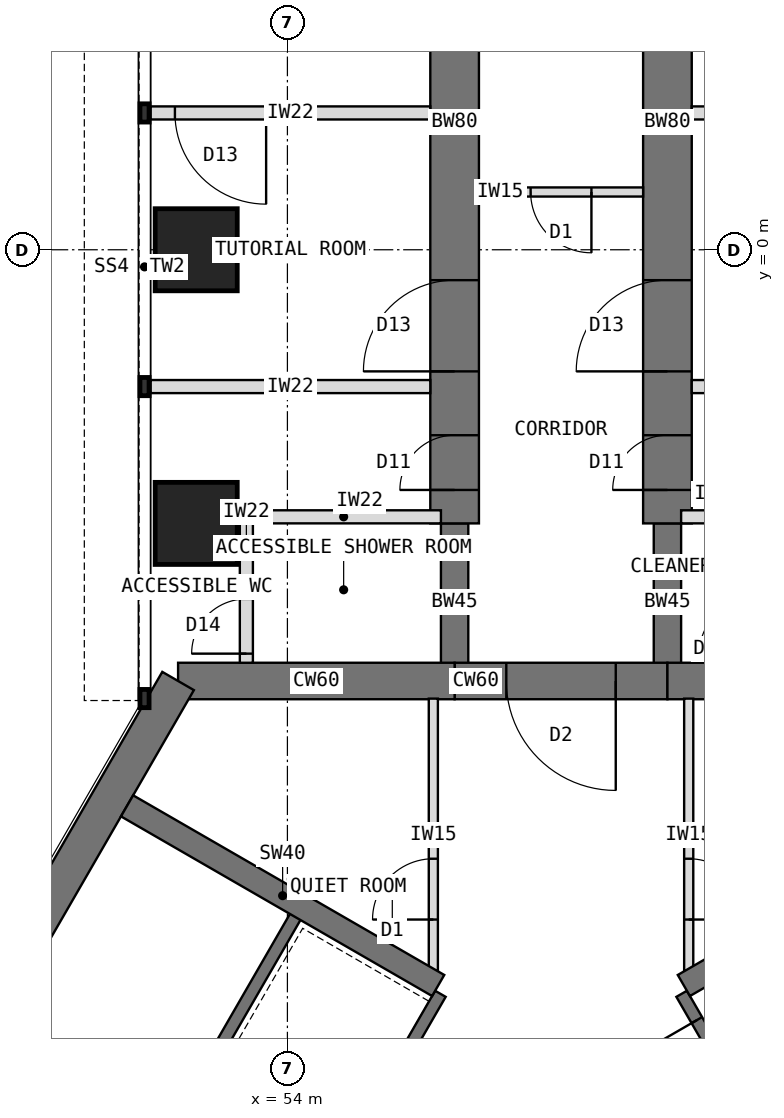
"""IFC4 building model, lengths in metres.
Left out: names, types, materials, properties, quantities, classifications, styles, units other than length and angle.
Written with IfcOpenShell. Run it as: python <this file> out.ifc"""

import sys

from ifc_helpers import new_model, si_unit, direction, frame, frame_2d, origin, origin_2d, place, context, subcontext, project, spatial, rectangle, extrude, element, fill, save


model = new_model("IFC4")
c1 = context("Model", 3, precision=1e-05, world=origin(), true_north=direction((0.0, 1.0)))
c2 = subcontext(c1, "Body", "Model", "MODEL_VIEW")
j1 = project(units=[si_unit("LENGTHUNIT", "METRE"), si_unit("PLANEANGLEUNIT", "RADIAN")], contexts=[c1])
p1 = place(None, origin())
s1 = spatial("IfcSite", under=j1, at=p1, CompositionType="ELEMENT")
p2 = place(p1, origin())
s2 = spatial("IfcBuilding", under=s1, at=p2, CompositionType="ELEMENT")
p3 = place(p2, frame((0.0, 0.0, 113.5)))
s3 = spatial("IfcBuildingStorey", under=s2, at=p3, CompositionType="ELEMENT", Elevation=113.5)
p4 = place(p3, frame((64.798, -7.092, 0.0), z_axis=(0.0, 0.0, 1.0), x_axis=(-1.0, 0.0, 0.0)))
e1 = element("IfcWall", 1, at=p4, inside=s3, PredefinedType="SHEAR", context=c2, shape_type="SweptSolid", body=[
    extrude(rectangle(XDim=4.548, YDim=0.6, at=frame_2d((2.274, 0.0))), origin(), (0.0, 0.0, 1.0), 4.0),
])
p5 = place(p3, frame((60.25, -7.092, 0.0), z_axis=(0.0, 0.0, 1.0), x_axis=(-1.0, 0.0, 0.0)))
e2 = element("IfcWall", 2, at=p5, inside=s3, PredefinedType="SHEAR", context=c2, shape_type="SweptSolid", body=[
    extrude(rectangle(XDim=3.5, YDim=0.6, at=frame_2d((1.75, 0.0))), origin(), (0.0, 0.0, 1.0), 4.0),
])
p6 = place(p5, frame((0.85, 0.0, 0.0)))
e3 = element("IfcOpeningElement", 3, at=p6, cuts=e2, PredefinedType="OPENING", context=c2, shape_type="SweptSolid", body=[
    extrude(rectangle(XDim=1.8, YDim=2.1, at=frame_2d((0.9, 1.05))), frame((0.0, 0.31, 0.0), z_axis=(0.0, -1.0, 0.0), x_axis=(1.0, 0.0, 0.0)), (0.0, 0.0, 1.0), 0.62),
])
p7 = place(p3, frame((56.75, -7.092, 0.0), z_axis=(0.0, 0.0, 1.0), x_axis=(-1.0, 0.0, 0.0)))
e4 = element("IfcWall", 4, at=p7, inside=s3, PredefinedType="SHEAR", context=c2, shape_type="SweptSolid", body=[
    extrude(rectangle(XDim=4.548, YDim=0.6, at=frame_2d((2.274, 0.0))), origin(), (0.0, 0.0, 1.0), 4.0),
])
p8 = place(p3, frame((52.202, -7.092, 0.0), z_axis=(0.0, 0.0, 1.0), x_axis=(-0.500005998175, -0.866021940709, 0.0)))
e5 = element("IfcWall", 5, at=p8, inside=s3, PredefinedType="SHEAR", context=c2, shape_type="SweptSolid", body=[
    extrude(rectangle(XDim=12.596, YDim=0.6, at=frame_2d((6.298, 0.0))), origin(), (0.0, 0.0, 1.0), 4.0),
])
p9 = place(p3, frame((56.75, -7.092, 0.0), z_axis=(0.0, 0.0, 1.0), x_axis=(0.0, 1.0, 0.0)))
e6 = element("IfcWall", 6, at=p9, inside=s3, PredefinedType="SHEAR", context=c2, shape_type="SweptSolid", body=[
    extrude(rectangle(XDim=2.592, YDim=0.45, at=frame_2d((1.296, 0.0))), origin(), (0.0, 0.0, 1.0), 4.0),
])
p10 = place(p3, frame((56.75, -4.5, 0.0), z_axis=(0.0, 0.0, 1.0), x_axis=(0.0, 1.0, 0.0)))
e7 = element("IfcWall", 7, at=p10, inside=s3, PredefinedType="SHEAR", context=c2, shape_type="SweptSolid", body=[
    extrude(rectangle(XDim=13.2, YDim=0.8, at=frame_2d((6.6, 0.0))), origin(), (0.0, 0.0, 1.0), 4.0),
])
p11 = place(p10, frame((0.55, 0.0, 0.0)))
e8 = element("IfcOpeningElement", 8, at=p11, cuts=e7, PredefinedType="OPENING", context=c2, shape_type="SweptSolid", body=[
    extrude(rectangle(XDim=0.9, YDim=2.1, at=frame_2d((0.45, 1.05))), frame((0.0, 0.41, 0.0), z_axis=(0.0, -1.0, 0.0), x_axis=(1.0, 0.0, 0.0)), (0.0, 0.0, 1.0), 0.82),
])
p12 = place(p10, frame((2.5, 0.0, 0.0)))
e9 = element("IfcOpeningElement", 9, at=p12, cuts=e7, PredefinedType="OPENING", context=c2, shape_type="SweptSolid", body=[
    extrude(rectangle(XDim=1.5, YDim=2.1, at=frame_2d((0.75, 1.05))), frame((0.0, 0.41, 0.0), z_axis=(0.0, -1.0, 0.0), x_axis=(1.0, 0.0, 0.0)), (0.0, 0.0, 1.0), 0.82),
])
p13 = place(p3, frame((60.25, -7.092, 0.0), z_axis=(0.0, 0.0, 1.0), x_axis=(0.0, 1.0, 0.0)))
e10 = element("IfcWall", 10, at=p13, inside=s3, PredefinedType="SHEAR", context=c2, shape_type="SweptSolid", body=[
    extrude(rectangle(XDim=2.592, YDim=0.45, at=frame_2d((1.296, 0.0))), origin(), (0.0, 0.0, 1.0), 4.0),
])
p14 = place(p3, frame((60.25, -4.5, 0.0), z_axis=(0.0, 0.0, 1.0), x_axis=(0.0, 1.0, 0.0)))
e11 = element("IfcWall", 11, at=p14, inside=s3, PredefinedType="SHEAR", context=c2, shape_type="SweptSolid", body=[
    extrude(rectangle(XDim=13.2, YDim=0.8, at=frame_2d((6.6, 0.0))), origin(), (0.0, 0.0, 1.0), 4.0),
])
p15 = place(p14, frame((0.55, 0.0, 0.0)))
e12 = element("IfcOpeningElement", 12, at=p15, cuts=e11, PredefinedType="OPENING", context=c2, shape_type="SweptSolid", body=[
    extrude(rectangle(XDim=0.9, YDim=2.1, at=frame_2d((0.45, 1.05))), frame((0.0, 0.41, 0.0), z_axis=(0.0, -1.0, 0.0), x_axis=(1.0, 0.0, 0.0)), (0.0, 0.0, 1.0), 0.82),
])
p16 = place(p14, frame((2.5, 0.0, 0.0)))
e13 = element("IfcOpeningElement", 13, at=p16, cuts=e11, PredefinedType="OPENING", context=c2, shape_type="SweptSolid", body=[
    extrude(rectangle(XDim=1.5, YDim=2.1, at=frame_2d((0.75, 1.05))), frame((0.0, 0.41, 0.0), z_axis=(0.0, -1.0, 0.0), x_axis=(1.0, 0.0, 0.0)), (0.0, 0.0, 1.0), 0.82),
])
for number, where, z_axis, x_axis in (
    (14, (52.5, -4.5, 0.0), (0.0, 0.0, 1.0), (1.0, 0.0, 0.0)),
    (15, (52.5, 0.0, 0.0), (0.0, 0.0, 1.0), (1.0, 0.0, 0.0)),
):
    element("IfcColumn", number, at=place(p3, frame(where, z_axis=z_axis, x_axis=x_axis)), inside=s3, PredefinedType="COLUMN", context=c2, shape_type="SweptSolid", body=[
        extrude(rectangle(XDim=1.35, YDim=1.35, at=origin_2d()), origin(), (0.0, 0.0, 1.0), 4.0),
    ])
p17 = place(p3, frame((56.516, -12.236, 0.0), z_axis=(0.0, 0.0, 1.0), x_axis=(-0.49999894854, -0.866026010844, 0.0)))
e16 = element("IfcWall", 16, at=p17, inside=s3, PredefinedType="SHEAR", context=c2, shape_type="SweptSolid", body=[
    extrude(rectangle(XDim=8.0, YDim=0.2, at=frame_2d((4.0, 0.0))), origin(), (0.0, 0.0, 1.0), 4.0),
])
p18 = place(p17, frame((6.3, 0.0, 0.0)))
e17 = element("IfcOpeningElement", 17, at=p18, cuts=e16, PredefinedType="OPENING", context=c2, shape_type="SweptSolid", body=[
    extrude(rectangle(XDim=1.2, YDim=2.1, at=frame_2d((0.6, 1.05))), frame((0.0, 0.11, 0.0), z_axis=(0.0, -1.0, 0.0), x_axis=(1.0, 0.0, 0.0)), (0.0, 0.0, 1.0), 0.22),
])
p19 = place(p3, frame((54.178, -10.886, 0.0), z_axis=(0.0, 0.0, 1.0), x_axis=(-0.49999894854, -0.866026010844, 0.0)))
e18 = element("IfcWall", 18, at=p19, inside=s3, PredefinedType="SHEAR", context=c2, shape_type="SweptSolid", body=[
    extrude(rectangle(XDim=8.0, YDim=0.2, at=frame_2d((4.0, 0.0))), origin(), (0.0, 0.0, 1.0), 4.0),
])
p20 = place(p19, frame((6.8, 0.0, 0.0)))
e19 = element("IfcOpeningElement", 19, at=p20, cuts=e18, PredefinedType="OPENING", context=c2, shape_type="SweptSolid", body=[
    extrude(rectangle(XDim=0.9, YDim=2.1, at=frame_2d((0.45, 1.05))), frame((0.0, 0.11, 0.0), z_axis=(0.0, -1.0, 0.0), x_axis=(1.0, 0.0, 0.0)), (0.0, 0.0, 1.0), 0.22),
])
p21 = place(p3, frame((56.48, -12.099, 0.0), z_axis=(0.0, 0.0, 1.0), x_axis=(-0.866009424208, 0.500027676417, 0.0)))
e20 = element("IfcWall", 20, at=p21, inside=s3, PredefinedType="SHEAR", context=c2, shape_type="SweptSolid", body=[
    extrude(rectangle(XDim=5.908, YDim=0.4, at=frame_2d((2.954, 0.0))), origin(), (0.0, 0.0, 1.0), 4.0),
])
p22 = place(p3, frame((64.484, -19.164, 0.0), z_axis=(0.0, 0.0, 1.0), x_axis=(-0.49999894854, 0.866026010844, 0.0)))
e21 = element("IfcWall", 21, at=p22, inside=s3, PredefinedType="SHEAR", context=c2, shape_type="SweptSolid", body=[
    extrude(rectangle(XDim=8.0, YDim=0.2, at=frame_2d((4.0, 0.0))), origin(), (0.0, 0.0, 1.0), 4.0),
])
p23 = place(p22, frame((6.3, 0.0, 0.0)))
e22 = element("IfcOpeningElement", 22, at=p23, cuts=e21, PredefinedType="OPENING", context=c2, shape_type="SweptSolid", body=[
    extrude(rectangle(XDim=1.2, YDim=2.1, at=frame_2d((0.6, 1.05))), frame((0.0, 0.11, 0.0), z_axis=(0.0, -1.0, 0.0), x_axis=(1.0, 0.0, 0.0)), (0.0, 0.0, 1.0), 0.22),
])
p24 = place(p22, frame((0.9, 0.0, 0.0)))
e23 = element("IfcOpeningElement", 23, at=p24, cuts=e21, PredefinedType="OPENING", context=c2, shape_type="SweptSolid", body=[
    extrude(rectangle(XDim=1.1, YDim=2.2, at=frame_2d((0.55, 1.1))), frame((0.0, 0.11, 0.0), z_axis=(0.0, -1.0, 0.0), x_axis=(1.0, 0.0, 0.0)), (0.0, 0.0, 1.0), 0.22),
])
p25 = place(p22, frame((3.8, 0.0, 0.0)))
e24 = element("IfcOpeningElement", 24, at=p25, cuts=e21, PredefinedType="OPENING", context=c2, shape_type="SweptSolid", body=[
    extrude(rectangle(XDim=1.1, YDim=2.2, at=frame_2d((0.55, 1.1))), frame((0.0, 0.11, 0.0), z_axis=(0.0, -1.0, 0.0), x_axis=(1.0, 0.0, 0.0)), (0.0, 0.0, 1.0), 0.22),
])
p26 = place(p3, frame((60.52, -12.099, 0.0), z_axis=(0.0, 0.0, 1.0), x_axis=(0.866009424208, 0.500027676417, 0.0)))
e25 = element("IfcWall", 25, at=p26, inside=s3, PredefinedType="SHEAR", context=c2, shape_type="SweptSolid", body=[
    extrude(rectangle(XDim=5.908, YDim=0.4, at=frame_2d((2.954, 0.0))), origin(), (0.0, 0.0, 1.0), 4.0),
])
p27 = place(p3, frame((56.35, -2.25, 0.0), z_axis=(0.0, 0.0, 1.0), x_axis=(-1.0, 0.0, 0.0)))
e26 = element("IfcWall", 26, at=p27, inside=s3, PredefinedType="PARTITIONING", context=c2, shape_type="SweptSolid", body=[
    extrude(rectangle(XDim=4.6, YDim=0.215, at=frame_2d((2.3, 0.0))), origin(), (0.0, 0.0, 1.0), 3.8),
])
p28 = place(p3, frame((56.35, 2.25, 0.0), z_axis=(0.0, 0.0, 1.0), x_axis=(-1.0, 0.0, 0.0)))
e27 = element("IfcWall", 27, at=p28, inside=s3, PredefinedType="PARTITIONING", context=c2, shape_type="SweptSolid", body=[
    extrude(rectangle(XDim=4.6, YDim=0.215, at=frame_2d((2.3, 0.0))), origin(), (0.0, 0.0, 1.0), 3.8),
])
p29 = place(p28, frame((2.7, 0.0, 0.0)))
e28 = element("IfcOpeningElement", 28, at=p29, cuts=e27, PredefinedType="OPENING", context=c2, shape_type="SweptSolid", body=[
    extrude(rectangle(XDim=1.5, YDim=2.1, at=frame_2d((0.75, 1.05))), frame((0.0, 0.117, 0.0), z_axis=(0.0, -1.0, 0.0), x_axis=(1.0, 0.0, 0.0)), (0.0, 0.0, 1.0), 0.235),
])
p30 = place(p3, frame((53.325, -6.792, 0.0), z_axis=(0.0, 0.0, 1.0), x_axis=(0.0, 1.0, 0.0)))
e29 = element("IfcWall", 29, at=p30, inside=s3, PredefinedType="PARTITIONING", context=c2, shape_type="SweptSolid", body=[
    extrude(rectangle(XDim=2.4, YDim=0.215, at=frame_2d((1.2, 0.0))), origin(), (0.0, 0.0, 1.0), 3.8),
])
p31 = place(p30, frame((0.15, 0.0, 0.0)))
e30 = element("IfcOpeningElement", 30, at=p31, cuts=e29, PredefinedType="OPENING", context=c2, shape_type="SweptSolid", body=[
    extrude(rectangle(XDim=0.9, YDim=2.1, at=frame_2d((0.45, 1.05))), frame((0.0, 0.117, 0.0), z_axis=(0.0, -1.0, 0.0), x_axis=(1.0, 0.0, 0.0)), (0.0, 0.0, 1.0), 0.235),
])
p32 = place(p3, frame((56.525, -4.392, 0.0), z_axis=(0.0, 0.0, 1.0), x_axis=(-1.0, 0.0, 0.0)))
e31 = element("IfcWall", 31, at=p32, inside=s3, PredefinedType="PARTITIONING", context=c2, shape_type="SweptSolid", body=[
    extrude(rectangle(XDim=3.2, YDim=0.215, at=frame_2d((1.6, 0.0))), origin(), (0.0, 0.0, 1.0), 3.8),
])
p33 = place(p3, frame((60.65, -2.25, 0.0), z_axis=(0.0, 0.0, 1.0), x_axis=(1.0, 0.0, 0.0)))
e32 = element("IfcWall", 32, at=p33, inside=s3, PredefinedType="PARTITIONING", context=c2, shape_type="SweptSolid", body=[
    extrude(rectangle(XDim=4.6, YDim=0.215, at=frame_2d((2.3, 0.0))), origin(), (0.0, 0.0, 1.0), 3.8),
])
p34 = place(p3, frame((60.65, 2.25, 0.0), z_axis=(0.0, 0.0, 1.0), x_axis=(1.0, 0.0, 0.0)))
e33 = element("IfcWall", 33, at=p34, inside=s3, PredefinedType="PARTITIONING", context=c2, shape_type="SweptSolid", body=[
    extrude(rectangle(XDim=4.6, YDim=0.215, at=frame_2d((2.3, 0.0))), origin(), (0.0, 0.0, 1.0), 3.8),
])
p35 = place(p34, frame((2.7, 0.0, 0.0)))
e34 = element("IfcOpeningElement", 34, at=p35, cuts=e33, PredefinedType="OPENING", context=c2, shape_type="SweptSolid", body=[
    extrude(rectangle(XDim=1.5, YDim=2.1, at=frame_2d((0.75, 1.05))), frame((0.0, 0.117, 0.0), z_axis=(0.0, -1.0, 0.0), x_axis=(1.0, 0.0, 0.0)), (0.0, 0.0, 1.0), 0.235),
])
p36 = place(p3, frame((60.475, -4.392, 0.0), z_axis=(0.0, 0.0, 1.0), x_axis=(1.0, 0.0, 0.0)))
e35 = element("IfcWall", 35, at=p36, inside=s3, PredefinedType="PARTITIONING", context=c2, shape_type="SweptSolid", body=[
    extrude(rectangle(XDim=1.2, YDim=0.215, at=frame_2d((0.6, 0.0))), origin(), (0.0, 0.0, 1.0), 3.8),
])
p37 = place(p3, frame((56.4, -11.857, 0.0), z_axis=(0.0, 0.0, 1.0), x_axis=(0.0, 1.0, 0.0)))
e36 = element("IfcWall", 36, at=p37, inside=s3, PredefinedType="PARTITIONING", context=c2, shape_type="SweptSolid", body=[
    extrude(rectangle(XDim=4.476, YDim=0.15, at=frame_2d((2.238, 0.0))), origin(), (0.0, 0.0, 1.0), 3.8),
])
p38 = place(p37, frame((0.843, 0.0, 0.0)))
e37 = element("IfcOpeningElement", 37, at=p38, cuts=e36, PredefinedType="OPENING", context=c2, shape_type="SweptSolid", body=[
    extrude(rectangle(XDim=1.0, YDim=2.1, at=frame_2d((0.5, 1.05))), frame((0.0, 0.085, 0.0), z_axis=(0.0, -1.0, 0.0), x_axis=(1.0, 0.0, 0.0)), (0.0, 0.0, 1.0), 0.17),
])
p39 = place(p3, frame((60.6, -7.382, 0.0), z_axis=(0.0, 0.0, 1.0), x_axis=(0.0, -1.0, 0.0)))
e38 = element("IfcWall", 38, at=p39, inside=s3, PredefinedType="PARTITIONING", context=c2, shape_type="SweptSolid", body=[
    extrude(rectangle(XDim=4.476, YDim=0.15, at=frame_2d((2.238, 0.0))), origin(), (0.0, 0.0, 1.0), 3.8),
])
p40 = place(p39, frame((2.633, 0.0, 0.0)))
e39 = element("IfcOpeningElement", 39, at=p40, cuts=e38, PredefinedType="OPENING", context=c2, shape_type="SweptSolid", body=[
    extrude(rectangle(XDim=1.0, YDim=2.1, at=frame_2d((0.5, 1.05))), frame((0.0, 0.085, 0.0), z_axis=(0.0, -1.0, 0.0), x_axis=(1.0, 0.0, 0.0)), (0.0, 0.0, 1.0), 0.17),
])
p41 = place(p3, frame((59.85, 0.95, 0.0), z_axis=(0.0, 0.0, 1.0), x_axis=(-1.0, 0.0, 0.0)))
e40 = element("IfcWall", 40, at=p41, inside=s3, PredefinedType="PARTITIONING", context=c2, shape_type="SweptSolid", body=[
    extrude(rectangle(XDim=2.7, YDim=0.15, at=frame_2d((1.35, 0.0))), origin(), (0.0, 0.0, 1.0), 3.8),
])
p42 = place(p41, frame((0.85, 0.0, 0.0)))
e41 = element("IfcOpeningElement", 41, at=p42, cuts=e40, PredefinedType="OPENING", context=c2, shape_type="SweptSolid", body=[
    extrude(rectangle(XDim=1.0, YDim=2.1, at=frame_2d((0.5, 1.05))), frame((0.0, 0.085, 0.0), z_axis=(0.0, -1.0, 0.0), x_axis=(1.0, 0.0, 0.0)), (0.0, 0.0, 1.0), 0.17),
])
p43 = place(p23, origin())
e42 = element("IfcDoor", 42, at=p43, inside=s3, OperationType="SINGLE_SWING_RIGHT", PredefinedType="DOOR", context=c2, shape_type="SweptSolid", body=[
    extrude(rectangle(XDim=1.2, YDim=2.1, at=frame_2d((0.6, 1.05))), frame((0.0, 0.025, 0.0), z_axis=(0.0, -1.0, 0.0), x_axis=(1.0, 0.0, 0.0)), (0.0, 0.0, 1.0), 0.05),
])
fill(e22, e42)
p44 = place(p6, origin())
e43 = element("IfcDoor", 43, at=p44, inside=s3, OperationType="DOUBLE_DOOR_DOUBLE_SWING", PredefinedType="DOOR", context=c2, shape_type="SweptSolid", body=[
    extrude(rectangle(XDim=1.72, YDim=2.06, at=frame_2d((0.9, 1.03))), frame((0.0, 0.025, 0.0), z_axis=(0.0, -1.0, 0.0), x_axis=(1.0, 0.0, 0.0)), (0.0, 0.0, 1.0), 0.05),
    extrude(rectangle(XDim=0.04, YDim=2.1, at=frame_2d((0.02, 1.05))), frame((0.0, 0.3, 0.0), z_axis=(0.0, -1.0, 0.0), x_axis=(1.0, 0.0, 0.0)), (0.0, 0.0, 1.0), 0.6),
    extrude(rectangle(XDim=0.04, YDim=2.1, at=frame_2d((1.78, 1.05))), frame((0.0, 0.3, 0.0), z_axis=(0.0, -1.0, 0.0), x_axis=(1.0, 0.0, 0.0)), (0.0, 0.0, 1.0), 0.6),
    extrude(rectangle(XDim=1.72, YDim=0.04, at=frame_2d((0.9, 2.08))), frame((0.0, 0.3, 0.0), z_axis=(0.0, -1.0, 0.0), x_axis=(1.0, 0.0, 0.0)), (0.0, 0.0, 1.0), 0.6),
])
fill(e3, e43)
p45 = place(p29, origin())
e44 = element("IfcDoor", 44, at=p45, inside=s3, OperationType="DOUBLE_DOOR_SINGLE_SWING", PredefinedType="DOOR", context=c2, shape_type="SweptSolid", body=[
    extrude(rectangle(XDim=1.5, YDim=2.1, at=frame_2d((0.75, 1.05))), frame((0.0, 0.025, 0.0), z_axis=(0.0, -1.0, 0.0), x_axis=(1.0, 0.0, 0.0)), (0.0, 0.0, 1.0), 0.05),
])
fill(e28, e44)
p46 = place(p31, origin())
e45 = element("IfcDoor", 45, at=p46, inside=s3, OperationType="SINGLE_SWING_LEFT", PredefinedType="DOOR", context=c2, shape_type="SweptSolid", body=[
    extrude(rectangle(XDim=0.9, YDim=2.1, at=frame_2d((0.45, 1.05))), frame((0.0, 0.025, 0.0), z_axis=(0.0, -1.0, 0.0), x_axis=(1.0, 0.0, 0.0)), (0.0, 0.0, 1.0), 0.05),
])
fill(e30, e45)
p47 = place(p40, origin())
e46 = element("IfcDoor", 46, at=p47, inside=s3, OperationType="SINGLE_SWING_RIGHT", PredefinedType="DOOR", context=c2, shape_type="SweptSolid", body=[
    extrude(rectangle(XDim=1.0, YDim=2.1, at=frame_2d((0.5, 1.05))), frame((0.0, 0.025, 0.0), z_axis=(0.0, -1.0, 0.0), x_axis=(1.0, 0.0, 0.0)), (0.0, 0.0, 1.0), 0.05),
])
fill(e39, e46)
p48 = place(p38, origin())
e47 = element("IfcDoor", 47, at=p48, inside=s3, OperationType="SINGLE_SWING_LEFT", PredefinedType="DOOR", context=c2, shape_type="SweptSolid", body=[
    extrude(rectangle(XDim=1.0, YDim=2.1, at=frame_2d((0.5, 1.05))), frame((0.0, 0.025, 0.0), z_axis=(0.0, -1.0, 0.0), x_axis=(1.0, 0.0, 0.0)), (0.0, 0.0, 1.0), 0.05),
])
fill(e37, e47)
p49 = place(p42, origin())
e48 = element("IfcDoor", 48, at=p49, inside=s3, OperationType="SINGLE_SWING_LEFT", PredefinedType="DOOR", context=c2, shape_type="SweptSolid", body=[
    extrude(rectangle(XDim=1.0, YDim=2.1, at=frame_2d((0.5, 1.05))), frame((0.0, 0.025, 0.0), z_axis=(0.0, -1.0, 0.0), x_axis=(1.0, 0.0, 0.0)), (0.0, 0.0, 1.0), 0.05),
])
fill(e41, e48)
p50 = place(p11, origin())
e49 = element("IfcDoor", 49, at=p50, inside=s3, OperationType="SINGLE_SWING_LEFT", PredefinedType="DOOR", context=c2, shape_type="SweptSolid", body=[
    extrude(rectangle(XDim=0.82, YDim=2.06, at=frame_2d((0.45, 1.03))), frame((0.0, 0.025, 0.0), z_axis=(0.0, -1.0, 0.0), x_axis=(1.0, 0.0, 0.0)), (0.0, 0.0, 1.0), 0.05),
    extrude(rectangle(XDim=0.04, YDim=2.1, at=frame_2d((0.02, 1.05))), frame((0.0, 0.4, 0.0), z_axis=(0.0, -1.0, 0.0), x_axis=(1.0, 0.0, 0.0)), (0.0, 0.0, 1.0), 0.8),
    extrude(rectangle(XDim=0.04, YDim=2.1, at=frame_2d((0.88, 1.05))), frame((0.0, 0.4, 0.0), z_axis=(0.0, -1.0, 0.0), x_axis=(1.0, 0.0, 0.0)), (0.0, 0.0, 1.0), 0.8),
    extrude(rectangle(XDim=0.82, YDim=0.04, at=frame_2d((0.45, 2.08))), frame((0.0, 0.4, 0.0), z_axis=(0.0, -1.0, 0.0), x_axis=(1.0, 0.0, 0.0)), (0.0, 0.0, 1.0), 0.8),
])
fill(e8, e49)
p51 = place(p12, origin())
e50 = element("IfcDoor", 50, at=p51, inside=s3, OperationType="DOUBLE_DOOR_SINGLE_SWING", PredefinedType="DOOR", context=c2, shape_type="SweptSolid", body=[
    extrude(rectangle(XDim=1.42, YDim=2.06, at=frame_2d((0.75, 1.03))), frame((0.0, 0.025, 0.0), z_axis=(0.0, -1.0, 0.0), x_axis=(1.0, 0.0, 0.0)), (0.0, 0.0, 1.0), 0.05),
    extrude(rectangle(XDim=0.04, YDim=2.1, at=frame_2d((0.02, 1.05))), frame((0.0, 0.4, 0.0), z_axis=(0.0, -1.0, 0.0), x_axis=(1.0, 0.0, 0.0)), (0.0, 0.0, 1.0), 0.8),
    extrude(rectangle(XDim=0.04, YDim=2.1, at=frame_2d((1.48, 1.05))), frame((0.0, 0.4, 0.0), z_axis=(0.0, -1.0, 0.0), x_axis=(1.0, 0.0, 0.0)), (0.0, 0.0, 1.0), 0.8),
    extrude(rectangle(XDim=1.42, YDim=0.04, at=frame_2d((0.75, 2.08))), frame((0.0, 0.4, 0.0), z_axis=(0.0, -1.0, 0.0), x_axis=(1.0, 0.0, 0.0)), (0.0, 0.0, 1.0), 0.8),
])
fill(e9, e50)
p52 = place(p15, origin())
e51 = element("IfcDoor", 51, at=p52, inside=s3, OperationType="SINGLE_SWING_LEFT", PredefinedType="DOOR", context=c2, shape_type="SweptSolid", body=[
    extrude(rectangle(XDim=0.82, YDim=2.06, at=frame_2d((0.45, 1.03))), frame((0.0, 0.025, 0.0), z_axis=(0.0, -1.0, 0.0), x_axis=(1.0, 0.0, 0.0)), (0.0, 0.0, 1.0), 0.05),
    extrude(rectangle(XDim=0.04, YDim=2.1, at=frame_2d((0.02, 1.05))), frame((0.0, 0.4, 0.0), z_axis=(0.0, -1.0, 0.0), x_axis=(1.0, 0.0, 0.0)), (0.0, 0.0, 1.0), 0.8),
    extrude(rectangle(XDim=0.04, YDim=2.1, at=frame_2d((0.88, 1.05))), frame((0.0, 0.4, 0.0), z_axis=(0.0, -1.0, 0.0), x_axis=(1.0, 0.0, 0.0)), (0.0, 0.0, 1.0), 0.8),
    extrude(rectangle(XDim=0.82, YDim=0.04, at=frame_2d((0.45, 2.08))), frame((0.0, 0.4, 0.0), z_axis=(0.0, -1.0, 0.0), x_axis=(1.0, 0.0, 0.0)), (0.0, 0.0, 1.0), 0.8),
])
fill(e12, e51)
p53 = place(p16, origin())
e52 = element("IfcDoor", 52, at=p53, inside=s3, OperationType="DOUBLE_DOOR_SINGLE_SWING", PredefinedType="DOOR", context=c2, shape_type="SweptSolid", body=[
    extrude(rectangle(XDim=1.42, YDim=2.06, at=frame_2d((0.75, 1.03))), frame((0.0, 0.025, 0.0), z_axis=(0.0, -1.0, 0.0), x_axis=(1.0, 0.0, 0.0)), (0.0, 0.0, 1.0), 0.05),
    extrude(rectangle(XDim=0.04, YDim=2.1, at=frame_2d((0.02, 1.05))), frame((0.0, 0.4, 0.0), z_axis=(0.0, -1.0, 0.0), x_axis=(1.0, 0.0, 0.0)), (0.0, 0.0, 1.0), 0.8),
    extrude(rectangle(XDim=0.04, YDim=2.1, at=frame_2d((1.48, 1.05))), frame((0.0, 0.4, 0.0), z_axis=(0.0, -1.0, 0.0), x_axis=(1.0, 0.0, 0.0)), (0.0, 0.0, 1.0), 0.8),
    extrude(rectangle(XDim=1.42, YDim=0.04, at=frame_2d((0.75, 2.08))), frame((0.0, 0.4, 0.0), z_axis=(0.0, -1.0, 0.0), x_axis=(1.0, 0.0, 0.0)), (0.0, 0.0, 1.0), 0.8),
])
fill(e13, e52)
save(model, sys.argv[1])
